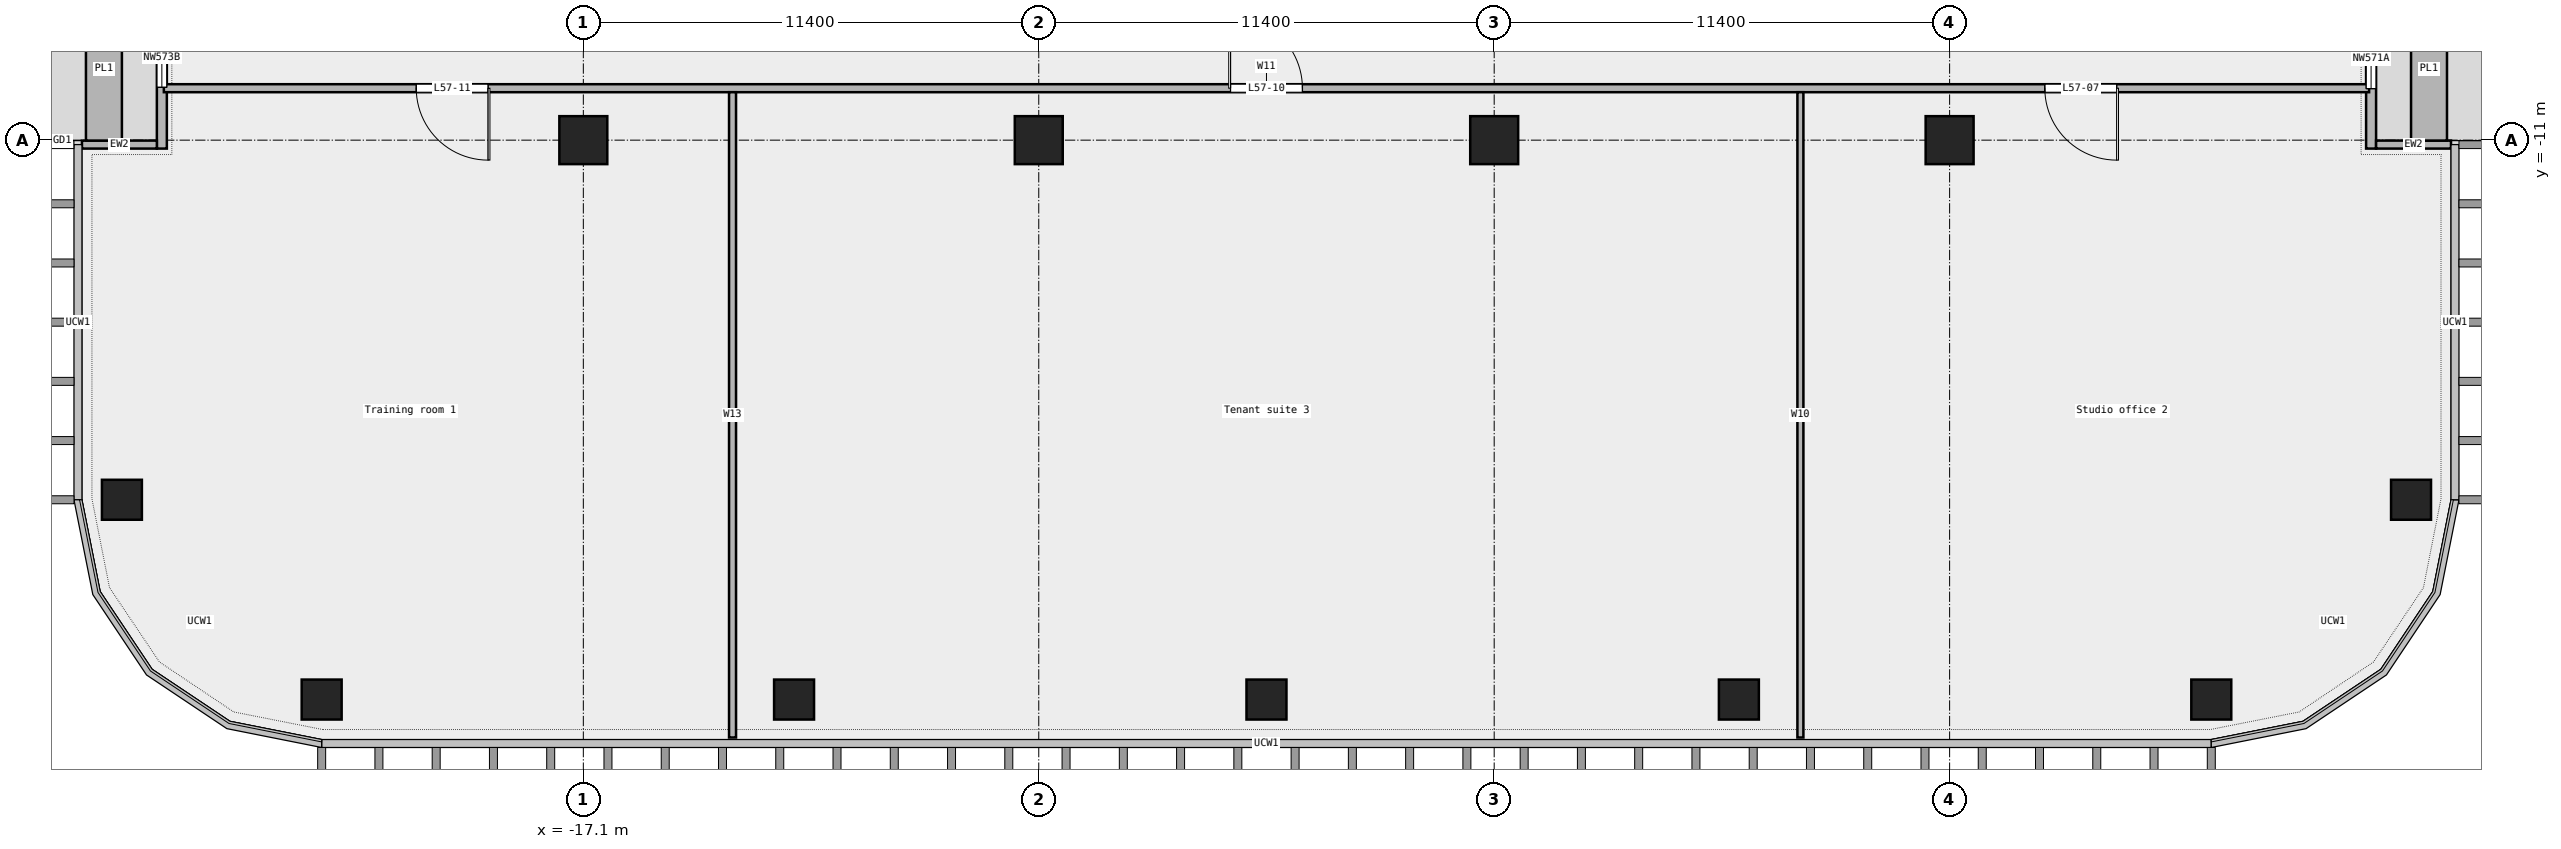
"""IFC4 building model, lengths in metres.
Left out: names, types, materials, properties, quantities, classifications, styles, units other than length and angle.
Written with IfcOpenShell. Run it as: python <this file> out.ifc"""

import sys

from ifc_helpers import new_model, si_unit, direction, frame, frame_2d, origin, origin_2d, place, context, subcontext, project, spatial, rectangle, extrude, element, fill, save


model = new_model("IFC4")
c1 = context("Model", 3, precision=1e-05, world=origin(), true_north=direction((0.0, 1.0)))
c2 = subcontext(c1, "Body", "Model", "MODEL_VIEW")
j1 = project(units=[si_unit("LENGTHUNIT", "METRE"), si_unit("PLANEANGLEUNIT", "RADIAN")], contexts=[c1])
p1 = place(None, origin())
s1 = spatial("IfcSite", under=j1, at=p1, CompositionType="ELEMENT")
p2 = place(p1, origin())
s2 = spatial("IfcBuilding", under=s1, at=p2, CompositionType="ELEMENT")
p3 = place(p2, frame((0.0, 0.0, 267.4)))
s3 = spatial("IfcBuildingStorey", under=s2, at=p3, CompositionType="ELEMENT", Elevation=267.4)
for number, where, z_axis, x_axis in (
    (1, (-23.65, -25.0, 0.0), (0.0, 0.0, 1.0), (1.0, 0.0, 0.0)),
    (2, (-11.825, -25.0, 0.0), (0.0, 0.0, 1.0), (1.0, 0.0, 0.0)),
    (3, (0.0, -25.0, 0.0), (0.0, 0.0, 1.0), (1.0, 0.0, 0.0)),
    (4, (11.825, -25.0, 0.0), (0.0, 0.0, 1.0), (1.0, 0.0, 0.0)),
    (5, (23.65, -25.0, 0.0), (0.0, 0.0, 1.0), (1.0, 0.0, 0.0)),
    (6, (28.65, -20.0, 0.0), (0.0, 0.0, 1.0), (1.0, 0.0, 0.0)),
    (7, (-28.65, -20.0, 0.0), (0.0, 0.0, 1.0), (1.0, 0.0, 0.0)),
):
    element("IfcColumn", number, at=place(p3, frame(where, z_axis=z_axis, x_axis=x_axis)), inside=s3, PredefinedType="COLUMN", context=c2, shape_type="SweptSolid", body=[
        extrude(rectangle(XDim=1.0, YDim=1.0, at=origin_2d()), origin(), (0.0, 0.0, 1.0), 3.6),
    ])
for number, where, z_axis, x_axis in (
    (8, (-17.1, -11.0, 0.0), (0.0, 0.0, 1.0), (1.0, 0.0, 0.0)),
    (9, (-5.7, -11.0, 0.0), (0.0, 0.0, 1.0), (1.0, 0.0, 0.0)),
    (10, (5.7, -11.0, 0.0), (0.0, 0.0, 1.0), (1.0, 0.0, 0.0)),
    (11, (17.1, -11.0, 0.0), (0.0, 0.0, 1.0), (1.0, 0.0, 0.0)),
):
    element("IfcColumn", number, at=place(p3, frame(where, z_axis=z_axis, x_axis=x_axis)), inside=s3, PredefinedType="COLUMN", context=c2, shape_type="SweptSolid", body=[
        extrude(rectangle(XDim=1.2, YDim=1.2, at=origin_2d()), origin(), (0.0, 0.0, 1.0), 3.6),
    ])
p4 = place(p3, frame((27.65, -11.211, 0.0), z_axis=(0.0, 0.0, 1.0), x_axis=(0.0, 1.0, 0.0)))
e12 = element("IfcWall", 12, at=p4, inside=s3, PredefinedType="STANDARD", context=c2, shape_type="SweptSolid", body=[
    extrude(rectangle(XDim=13.533, YDim=0.25, at=frame_2d((6.767, 0.0))), origin(), (0.0, 0.0, 1.0), 3.6),
])
p5 = place(p4, frame((1.5, 0.0, 0.45)))
e13 = element("IfcOpeningElement", 13, at=p5, cuts=e12, PredefinedType="OPENING", context=c2, shape_type="SweptSolid", body=[
    extrude(rectangle(XDim=1.5, YDim=2.4, at=frame_2d((0.75, 1.2))), frame((0.0, 0.137, 0.0), z_axis=(0.0, -1.0, 0.0), x_axis=(1.0, 0.0, 0.0)), (0.0, 0.0, 1.0), 0.274),
])
p6 = place(p4, frame((5.75, 0.0, 0.0)))
e14 = element("IfcOpeningElement", 14, at=p6, cuts=e12, PredefinedType="OPENING", context=c2, shape_type="SweptSolid", body=[
    extrude(rectangle(XDim=1.8, YDim=2.4, at=frame_2d((0.9, 1.2))), frame((0.0, 0.137, 0.0), z_axis=(0.0, -1.0, 0.0), x_axis=(1.0, 0.0, 0.0)), (0.0, 0.0, 1.0), 0.274),
])
p7 = place(p4, frame((10.5, 0.0, 0.45)))
e15 = element("IfcOpeningElement", 15, at=p7, cuts=e12, PredefinedType="OPENING", context=c2, shape_type="SweptSolid", body=[
    extrude(rectangle(XDim=1.5, YDim=2.4, at=frame_2d((0.75, 1.2))), frame((0.0, 0.137, 0.0), z_axis=(0.0, -1.0, 0.0), x_axis=(1.0, 0.0, 0.0)), (0.0, 0.0, 1.0), 0.274),
])
p8 = place(p3, frame((29.65, -11.111, 0.0), z_axis=(0.0, 0.0, 1.0), x_axis=(-1.0, 0.0, 0.0)))
e16 = element("IfcWall", 16, at=p8, inside=s3, PredefinedType="STANDARD", context=c2, shape_type="SweptSolid", body=[
    extrude(rectangle(XDim=1.875, YDim=0.2, at=frame_2d((0.938, 0.0))), origin(), (0.0, 0.0, 1.0), 3.6),
])
p9 = place(p3, frame((29.1, -11.011, 0.0), z_axis=(0.0, 0.0, 1.0), x_axis=(0.0, 1.0, 0.0)))
e17 = element("IfcWall", 17, at=p9, inside=s3, PredefinedType="STANDARD", context=c2, shape_type="SweptSolid", body=[
    extrude(rectangle(XDim=3.6, YDim=0.9, at=frame_2d((1.8, 0.0))), origin(), (0.0, 0.0, 1.0), 0.7),
])
p10 = place(p3, frame((-27.65, 2.322, 0.0), z_axis=(0.0, 0.0, 1.0), x_axis=(0.0, -1.0, 0.0)))
e18 = element("IfcWall", 18, at=p10, inside=s3, PredefinedType="STANDARD", context=c2, shape_type="SweptSolid", body=[
    extrude(rectangle(XDim=13.533, YDim=0.25, at=frame_2d((6.767, 0.0))), origin(), (0.0, 0.0, 1.0), 3.6),
])
p11 = place(p10, frame((1.5, 0.0, 0.45)))
e19 = element("IfcOpeningElement", 19, at=p11, cuts=e18, PredefinedType="OPENING", context=c2, shape_type="SweptSolid", body=[
    extrude(rectangle(XDim=1.5, YDim=2.4, at=frame_2d((0.75, 1.2))), frame((0.0, 0.137, 0.0), z_axis=(0.0, -1.0, 0.0), x_axis=(1.0, 0.0, 0.0)), (0.0, 0.0, 1.0), 0.274),
])
p12 = place(p10, frame((5.75, 0.0, 0.0)))
e20 = element("IfcOpeningElement", 20, at=p12, cuts=e18, PredefinedType="OPENING", context=c2, shape_type="SweptSolid", body=[
    extrude(rectangle(XDim=1.8, YDim=2.4, at=frame_2d((0.9, 1.2))), frame((0.0, 0.137, 0.0), z_axis=(0.0, -1.0, 0.0), x_axis=(1.0, 0.0, 0.0)), (0.0, 0.0, 1.0), 0.274),
])
p13 = place(p10, frame((10.5, 0.0, 0.45)))
e21 = element("IfcOpeningElement", 21, at=p13, cuts=e18, PredefinedType="OPENING", context=c2, shape_type="SweptSolid", body=[
    extrude(rectangle(XDim=1.5, YDim=2.4, at=frame_2d((0.75, 1.2))), frame((0.0, 0.137, 0.0), z_axis=(0.0, -1.0, 0.0), x_axis=(1.0, 0.0, 0.0)), (0.0, 0.0, 1.0), 0.274),
])
p14 = place(p3, frame((-29.65, -11.111, 0.0), z_axis=(0.0, 0.0, 1.0), x_axis=(1.0, 0.0, 0.0)))
e22 = element("IfcWall", 22, at=p14, inside=s3, PredefinedType="STANDARD", context=c2, shape_type="SweptSolid", body=[
    extrude(rectangle(XDim=1.875, YDim=0.2, at=frame_2d((0.938, 0.0))), origin(), (0.0, 0.0, 1.0), 3.6),
])
p15 = place(p3, frame((-29.1, -7.411, 0.0), z_axis=(0.0, 0.0, 1.0), x_axis=(0.0, -1.0, 0.0)))
e23 = element("IfcWall", 23, at=p15, inside=s3, PredefinedType="STANDARD", context=c2, shape_type="SweptSolid", body=[
    extrude(rectangle(XDim=3.6, YDim=0.9, at=frame_2d((1.8, 0.0))), origin(), (0.0, 0.0, 1.0), 0.7),
])
p16 = place(p3, frame((-27.6, -9.7, 0.0), z_axis=(0.0, 0.0, 1.0), x_axis=(1.0, 0.0, 0.0)))
e24 = element("IfcWall", 24, at=p16, inside=s3, PredefinedType="PARTITIONING", context=c2, shape_type="SweptSolid", body=[
    extrude(rectangle(XDim=55.2, YDim=0.2, at=frame_2d((27.6, 0.0))), origin(), (0.0, 0.0, 1.0), 3.6),
])
p17 = place(p16, frame((47.083, 0.0, 0.0)))
e25 = element("IfcOpeningElement", 25, at=p17, cuts=e24, PredefinedType="OPENING", context=c2, shape_type="SweptSolid", body=[
    extrude(rectangle(XDim=1.8, YDim=2.1, at=frame_2d((0.9, 1.05))), frame((0.0, 0.112, 0.0), z_axis=(0.0, -1.0, 0.0), x_axis=(1.0, 0.0, 0.0)), (0.0, 0.0, 1.0), 0.224),
])
p18 = place(p16, frame((26.7, 0.0, 0.0)))
e26 = element("IfcOpeningElement", 26, at=p18, cuts=e24, PredefinedType="OPENING", context=c2, shape_type="SweptSolid", body=[
    extrude(rectangle(XDim=1.8, YDim=2.1, at=frame_2d((0.9, 1.05))), frame((0.0, 0.112, 0.0), z_axis=(0.0, -1.0, 0.0), x_axis=(1.0, 0.0, 0.0)), (0.0, 0.0, 1.0), 0.224),
])
p19 = place(p16, frame((6.317, 0.0, 0.0)))
e27 = element("IfcOpeningElement", 27, at=p19, cuts=e24, PredefinedType="OPENING", context=c2, shape_type="SweptSolid", body=[
    extrude(rectangle(XDim=1.8, YDim=2.1, at=frame_2d((0.9, 1.05))), frame((0.0, 0.112, 0.0), z_axis=(0.0, -1.0, 0.0), x_axis=(1.0, 0.0, 0.0)), (0.0, 0.0, 1.0), 0.224),
])
p20 = place(p3, frame((-13.365, -25.95, 0.0), z_axis=(0.0, 0.0, 1.0), x_axis=(0.0, 1.0, 0.0)))
e28 = element("IfcWall", 28, at=p20, inside=s3, PredefinedType="PARTITIONING", context=c2, shape_type="SweptSolid", body=[
    extrude(rectangle(XDim=16.15, YDim=0.175, at=frame_2d((8.075, 0.0))), origin(), (0.0, 0.0, 1.0), 3.6),
])
p21 = place(p3, frame((13.365, -25.95, 0.0), z_axis=(0.0, 0.0, 1.0), x_axis=(0.0, 1.0, 0.0)))
e29 = element("IfcWall", 29, at=p21, inside=s3, PredefinedType="PARTITIONING", context=c2, shape_type="SweptSolid", body=[
    extrude(rectangle(XDim=16.15, YDim=0.15, at=frame_2d((8.075, 0.0))), origin(), (0.0, 0.0, 1.0), 3.6),
])
p22 = place(p5, origin())
e30 = element("IfcWindow", 30, at=p22, inside=s3, PartitioningType="SINGLE_PANEL", PredefinedType="WINDOW", context=c2, shape_type="SweptSolid", body=[
    extrude(rectangle(XDim=1.5, YDim=2.4, at=frame_2d((0.75, 1.2))), frame((0.0, 0.03, 0.0), z_axis=(0.0, -1.0, 0.0), x_axis=(1.0, 0.0, 0.0)), (0.0, 0.0, 1.0), 0.06),
])
fill(e13, e30)
p23 = place(p13, origin())
e31 = element("IfcWindow", 31, at=p23, inside=s3, PartitioningType="SINGLE_PANEL", PredefinedType="WINDOW", context=c2, shape_type="SweptSolid", body=[
    extrude(rectangle(XDim=1.5, YDim=2.4, at=frame_2d((0.75, 1.2))), frame((0.0, 0.03, 0.0), z_axis=(0.0, -1.0, 0.0), x_axis=(1.0, 0.0, 0.0)), (0.0, 0.0, 1.0), 0.06),
])
fill(e21, e31)
p24 = place(p17, origin())
e32 = element("IfcDoor", 32, at=p24, inside=s3, OperationType="DOUBLE_DOOR_SINGLE_SWING", PredefinedType="DOOR", context=c2, shape_type="SweptSolid", body=[
    extrude(rectangle(XDim=1.8, YDim=2.1, at=frame_2d((0.9, 1.05))), frame((0.0, 0.025, 0.0), z_axis=(0.0, -1.0, 0.0), x_axis=(1.0, 0.0, 0.0)), (0.0, 0.0, 1.0), 0.05),
])
fill(e25, e32)
p25 = place(p18, origin())
e33 = element("IfcDoor", 33, at=p25, inside=s3, OperationType="DOUBLE_DOOR_SINGLE_SWING", PredefinedType="DOOR", context=c2, shape_type="SweptSolid", body=[
    extrude(rectangle(XDim=1.8, YDim=2.1, at=frame_2d((0.9, 1.05))), frame((0.0, 0.025, 0.0), z_axis=(0.0, -1.0, 0.0), x_axis=(1.0, 0.0, 0.0)), (0.0, 0.0, 1.0), 0.05),
])
fill(e26, e33)
p26 = place(p19, origin())
e34 = element("IfcDoor", 34, at=p26, inside=s3, OperationType="DOUBLE_DOOR_SINGLE_SWING", PredefinedType="DOOR", context=c2, shape_type="SweptSolid", body=[
    extrude(rectangle(XDim=1.8, YDim=2.1, at=frame_2d((0.9, 1.05))), frame((0.0, 0.025, 0.0), z_axis=(0.0, -1.0, 0.0), x_axis=(1.0, 0.0, 0.0)), (0.0, 0.0, 1.0), 0.05),
])
fill(e27, e34)
save(model, sys.argv[1])
